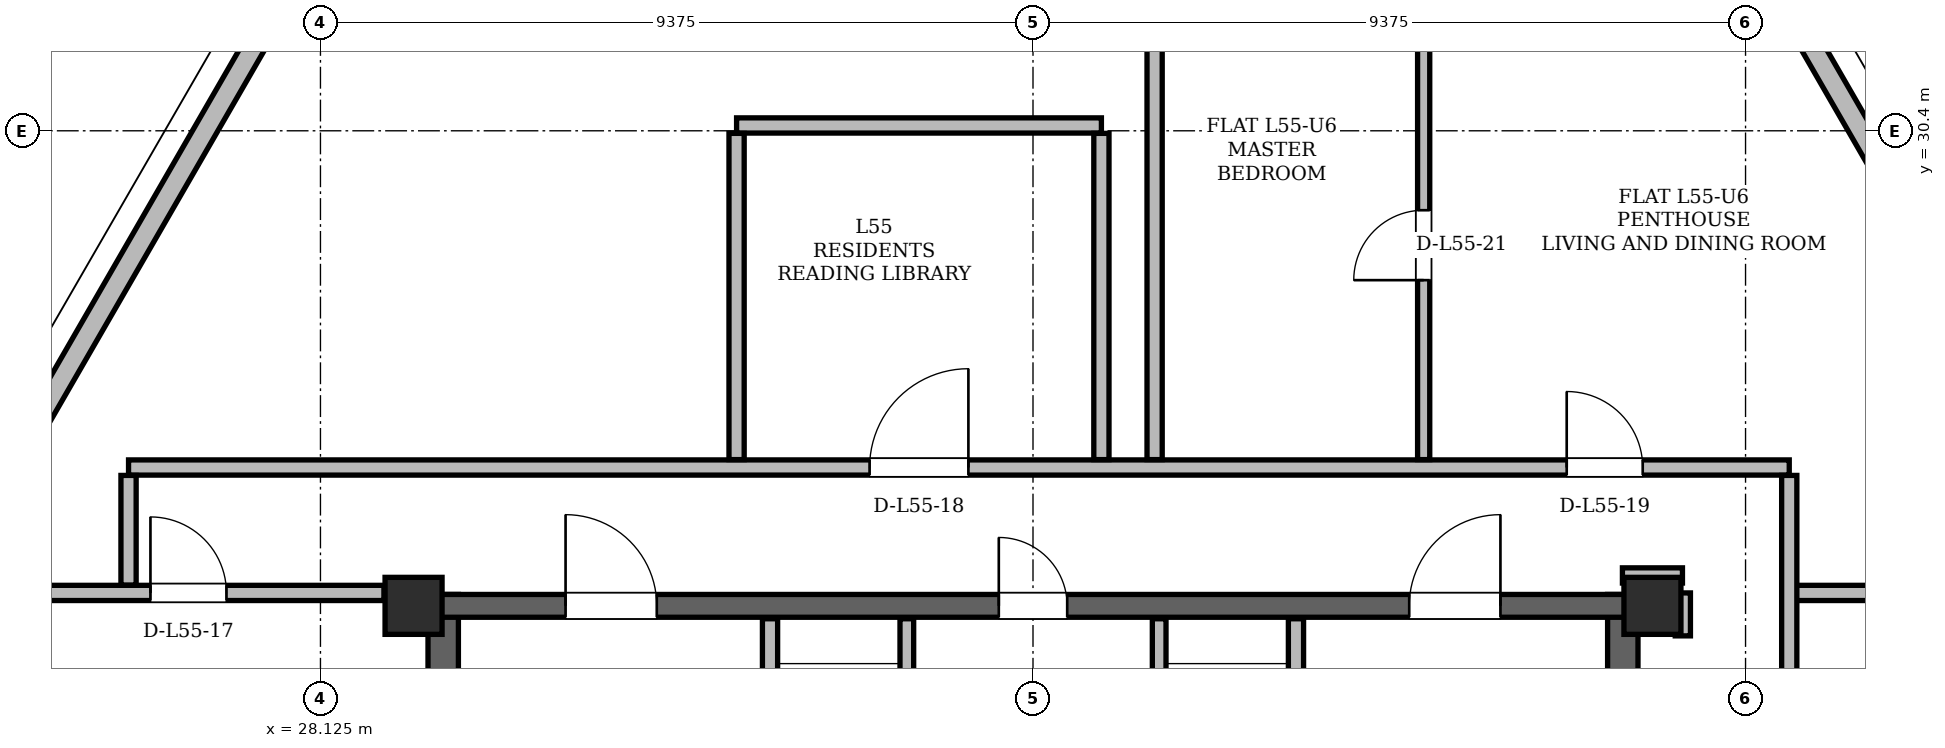
"""IFC4 building model, lengths in metres.
Left out: names, types, materials, properties, quantities, classifications, styles, units other than length and angle.
Written with IfcOpenShell. Run it as: python <this file> out.ifc"""

import sys

from ifc_helpers import new_model, si_unit, direction, frame, frame_2d, origin, origin_2d, place, context, subcontext, project, spatial, rectangle, hollow_rectangle, extrude, element, fill, save


model = new_model("IFC4")
c1 = context("Model", 3, precision=1e-05, world=origin(), true_north=direction((0.0, 1.0)))
c2 = subcontext(c1, "Body", "Model", "MODEL_VIEW")
j1 = project(units=[si_unit("LENGTHUNIT", "METRE"), si_unit("PLANEANGLEUNIT", "RADIAN")], contexts=[c1])
p1 = place(None, origin())
s1 = spatial("IfcSite", under=j1, at=p1, CompositionType="ELEMENT")
p2 = place(p1, origin())
s2 = spatial("IfcBuilding", under=s1, at=p2, CompositionType="ELEMENT")
p3 = place(p2, frame((0.0, 0.0, 209.1)))
s3 = spatial("IfcBuildingStorey", under=s2, at=p3, CompositionType="ELEMENT", Elevation=209.1)
for number, where, z_axis, x_axis in (
    (1, (45.65, 24.15, 0.0), (0.0, 0.0, 1.0), (1.0, 0.0, 0.0)),
    (2, (29.35, 24.15, 0.0), (0.0, 0.0, 1.0), (1.0, 0.0, 0.0)),
):
    element("IfcColumn", number, at=place(p3, frame(where, z_axis=z_axis, x_axis=x_axis)), inside=s3, PredefinedType="COLUMN", context=c2, shape_type="SweptSolid", body=[
        extrude(hollow_rectangle(XDim=0.75, YDim=0.75, WallThickness=0.06, at=origin_2d()), origin(), (0.0, 0.0, 1.0), 3.6),
    ])
for number, where, z_axis, x_axis in (
    (3, (29.74, 11.0, 0.0), (0.0, 0.0, 1.0), (0.0, 1.0, 0.0)),
    (4, (45.26, 11.0, 0.0), (0.0, 0.0, 1.0), (0.0, 1.0, 0.0)),
):
    element("IfcWall", number, at=place(p3, frame(where, z_axis=z_axis, x_axis=x_axis)), inside=s3, PredefinedType="SHEAR", context=c2, shape_type="SweptSolid", body=[
        extrude(rectangle(XDim=13.3, YDim=0.4, at=frame_2d((6.65, 0.0))), origin(), (0.0, 0.0, 1.0), 3.38),
    ])
p4 = place(p3, frame((29.65, 24.15, 0.0), z_axis=(0.0, 0.0, 1.0), x_axis=(1.0, 0.0, 0.0)))
e5 = element("IfcWall", 5, at=p4, inside=s3, PredefinedType="SHEAR", context=c2, shape_type="SweptSolid", body=[
    extrude(rectangle(XDim=15.7, YDim=0.3, at=frame_2d((7.85, 0.0))), origin(), (0.0, 0.0, 1.0), 3.38),
])
p5 = place(p4, frame((1.7, 0.0, 0.0)))
e6 = element("IfcOpeningElement", 6, at=p5, cuts=e5, PredefinedType="OPENING", context=c2, shape_type="SweptSolid", body=[
    extrude(rectangle(XDim=1.2, YDim=2.2, at=frame_2d((0.6, 1.1))), frame((0.0, 0.15, 0.0), z_axis=(0.0, -1.0, 0.0), x_axis=(1.0, 0.0, 0.0)), (0.0, 0.0, 1.0), 0.3),
])
p6 = place(p4, frame((12.8, 0.0, 0.0)))
e7 = element("IfcOpeningElement", 7, at=p6, cuts=e5, PredefinedType="OPENING", context=c2, shape_type="SweptSolid", body=[
    extrude(rectangle(XDim=1.2, YDim=2.2, at=frame_2d((0.6, 1.1))), frame((0.0, 0.15, 0.0), z_axis=(0.0, -1.0, 0.0), x_axis=(1.0, 0.0, 0.0)), (0.0, 0.0, 1.0), 0.3),
])
p7 = place(p4, frame((7.4, 0.0, 0.0)))
e8 = element("IfcOpeningElement", 8, at=p7, cuts=e5, PredefinedType="OPENING", context=c2, shape_type="SweptSolid", body=[
    extrude(rectangle(XDim=0.9, YDim=2.05, at=frame_2d((0.45, 1.025))), frame((0.0, 0.15, 0.0), z_axis=(0.0, -1.0, 0.0), x_axis=(1.0, 0.0, 0.0)), (0.0, 0.0, 1.0), 0.3),
])
p8 = place(p3, frame((59.246, 11.601, 0.0), z_axis=(0.0, 0.0, 1.0), x_axis=(-0.50000139879, 0.866024596191, 0.0)))
e9 = element("IfcWall", 9, at=p8, inside=s3, PredefinedType="SOLIDWALL", context=c2, shape_type="SweptSolid", body=[
    extrude(rectangle(XDim=36.467, YDim=0.29, at=frame_2d((18.233, 0.0))), origin(), (0.0, 0.0, 1.0), 2.677),
])
p9 = place(p8, frame((6.789, 0.0, 0.0)))
e10 = element("IfcOpeningElement", 10, at=p9, cuts=e9, PredefinedType="OPENING", context=c2, shape_type="SweptSolid", body=[
    extrude(rectangle(XDim=1.5, YDim=2.2, at=frame_2d((0.75, 1.1))), frame((0.0, 0.145, 0.0), z_axis=(0.0, -1.0, 0.0), x_axis=(1.0, 0.0, 0.0)), (0.0, 0.0, 1.0), 0.29),
])
p10 = place(p8, frame((26.932, 0.0, 0.0)))
e11 = element("IfcOpeningElement", 11, at=p10, cuts=e9, PredefinedType="OPENING", context=c2, shape_type="SweptSolid", body=[
    extrude(rectangle(XDim=1.5, YDim=2.2, at=frame_2d((0.75, 1.1))), frame((0.0, 0.145, 0.0), z_axis=(0.0, -1.0, 0.0), x_axis=(1.0, 0.0, 0.0)), (0.0, 0.0, 1.0), 0.29),
])
p11 = place(p8, frame((12.324, 0.0, 0.85)))
e12 = element("IfcOpeningElement", 12, at=p11, cuts=e9, PredefinedType="OPENING", context=c2, shape_type="SweptSolid", body=[
    extrude(rectangle(XDim=1.2, YDim=1.48, at=frame_2d((0.6, 0.74))), frame((0.0, 0.145, 0.0), z_axis=(0.0, -1.0, 0.0), x_axis=(1.0, 0.0, 0.0)), (0.0, 0.0, 1.0), 0.29),
])
p12 = place(p8, frame((2.218, 0.0, 0.85)))
e13 = element("IfcOpeningElement", 13, at=p12, cuts=e9, PredefinedType="OPENING", context=c2, shape_type="SweptSolid", body=[
    extrude(rectangle(XDim=1.2, YDim=1.48, at=frame_2d((0.6, 0.74))), frame((0.0, 0.145, 0.0), z_axis=(0.0, -1.0, 0.0), x_axis=(1.0, 0.0, 0.0)), (0.0, 0.0, 1.0), 0.29),
])
p13 = place(p8, frame((17.24, 0.0, 0.85)))
e14 = element("IfcOpeningElement", 14, at=p13, cuts=e9, PredefinedType="OPENING", context=c2, shape_type="SweptSolid", body=[
    extrude(rectangle(XDim=2.6, YDim=1.717, at=frame_2d((1.3, 0.858))), frame((0.0, 0.145, 0.0), z_axis=(0.0, -1.0, 0.0), x_axis=(1.0, 0.0, 0.0)), (0.0, 0.0, 1.0), 0.29),
])
p14 = place(p8, frame((34.098, 0.0, 0.85)))
e15 = element("IfcOpeningElement", 15, at=p14, cuts=e9, PredefinedType="OPENING", context=c2, shape_type="SweptSolid", body=[
    extrude(rectangle(XDim=1.2, YDim=1.48, at=frame_2d((0.6, 0.74))), frame((0.0, 0.145, 0.0), z_axis=(0.0, -1.0, 0.0), x_axis=(1.0, 0.0, 0.0)), (0.0, 0.0, 1.0), 0.29),
])
p15 = place(p3, frame((33.988, 43.182, 0.0), z_axis=(0.0, 0.0, 1.0), x_axis=(-0.50000139879, -0.866024596191, 0.0)))
e16 = element("IfcWall", 16, at=p15, inside=s3, PredefinedType="SOLIDWALL", context=c2, shape_type="SweptSolid", body=[
    extrude(rectangle(XDim=36.467, YDim=0.29, at=frame_2d((18.233, 0.0))), origin(), (0.0, 0.0, 1.0), 2.677),
])
p16 = place(p15, frame((3.429, 0.0, 0.0)))
e17 = element("IfcOpeningElement", 17, at=p16, cuts=e16, PredefinedType="OPENING", context=c2, shape_type="SweptSolid", body=[
    extrude(rectangle(XDim=1.5, YDim=2.2, at=frame_2d((0.75, 1.1))), frame((0.0, 0.145, 0.0), z_axis=(0.0, -1.0, 0.0), x_axis=(1.0, 0.0, 0.0)), (0.0, 0.0, 1.0), 0.29),
])
p17 = place(p15, frame((26.722, 0.0, 0.0)))
e18 = element("IfcOpeningElement", 18, at=p17, cuts=e16, PredefinedType="OPENING", context=c2, shape_type="SweptSolid", body=[
    extrude(rectangle(XDim=1.5, YDim=2.2, at=frame_2d((0.75, 1.1))), frame((0.0, 0.145, 0.0), z_axis=(0.0, -1.0, 0.0), x_axis=(1.0, 0.0, 0.0)), (0.0, 0.0, 1.0), 0.29),
])
p18 = place(p15, frame((33.056, 0.0, 0.85)))
e19 = element("IfcOpeningElement", 19, at=p18, cuts=e16, PredefinedType="OPENING", context=c2, shape_type="SweptSolid", body=[
    extrude(rectangle(XDim=1.6, YDim=1.7, at=frame_2d((0.8, 0.85))), frame((0.0, 0.145, 0.0), z_axis=(0.0, -1.0, 0.0), x_axis=(1.0, 0.0, 0.0)), (0.0, 0.0, 1.0), 0.29),
])
p19 = place(p15, frame((22.736, 0.0, 0.85)))
e20 = element("IfcOpeningElement", 20, at=p19, cuts=e16, PredefinedType="OPENING", context=c2, shape_type="SweptSolid", body=[
    extrude(rectangle(XDim=1.2, YDim=1.48, at=frame_2d((0.6, 0.74))), frame((0.0, 0.145, 0.0), z_axis=(0.0, -1.0, 0.0), x_axis=(1.0, 0.0, 0.0)), (0.0, 0.0, 1.0), 0.29),
])
p20 = place(p3, frame((34.04, 19.48, 0.0), z_axis=(0.0, 0.0, 1.0), x_axis=(0.0, 1.0, 0.0)))
e21 = element("IfcWall", 21, at=p20, inside=s3, PredefinedType="PARTITIONING", context=c2, shape_type="SweptSolid", body=[
    extrude(rectangle(XDim=4.5, YDim=0.2, at=frame_2d((2.25, 0.0))), origin(), (0.0, 0.0, 1.0), 3.38),
])
p21 = place(p20, frame((2.12, 0.0, 0.0)))
e22 = element("IfcOpeningElement", 22, at=p21, cuts=e21, PredefinedType="OPENING", context=c2, shape_type="SweptSolid", body=[
    extrude(rectangle(XDim=1.1, YDim=2.2, at=frame_2d((0.55, 1.1))), frame((0.0, 0.1, 0.0), z_axis=(0.0, -1.0, 0.0), x_axis=(1.0, 0.0, 0.0)), (0.0, 0.0, 1.0), 0.2),
])
p22 = place(p3, frame((35.84, 20.96, 0.0), z_axis=(0.0, 0.0, 1.0), x_axis=(0.0, 1.0, 0.0)))
e23 = element("IfcWall", 23, at=p22, inside=s3, PredefinedType="PARTITIONING", context=c2, shape_type="SweptSolid", body=[
    extrude(rectangle(XDim=3.02, YDim=0.18, at=frame_2d((1.51, 0.0))), origin(), (0.0, 0.0, 1.0), 3.38),
])
p23 = place(p3, frame((40.96, 19.48, 0.0), z_axis=(0.0, 0.0, 1.0), x_axis=(0.0, 1.0, 0.0)))
e24 = element("IfcWall", 24, at=p23, inside=s3, PredefinedType="PARTITIONING", context=c2, shape_type="SweptSolid", body=[
    extrude(rectangle(XDim=4.5, YDim=0.2, at=frame_2d((2.25, 0.0))), origin(), (0.0, 0.0, 1.0), 3.38),
])
p24 = place(p23, frame((2.12, 0.0, 0.0)))
e25 = element("IfcOpeningElement", 25, at=p24, cuts=e24, PredefinedType="OPENING", context=c2, shape_type="SweptSolid", body=[
    extrude(rectangle(XDim=1.1, YDim=2.2, at=frame_2d((0.55, 1.1))), frame((0.0, 0.1, 0.0), z_axis=(0.0, -1.0, 0.0), x_axis=(1.0, 0.0, 0.0)), (0.0, 0.0, 1.0), 0.2),
])
p25 = place(p3, frame((39.16, 20.96, 0.0), z_axis=(0.0, 0.0, 1.0), x_axis=(0.0, 1.0, 0.0)))
e26 = element("IfcWall", 26, at=p25, inside=s3, PredefinedType="PARTITIONING", context=c2, shape_type="SweptSolid", body=[
    extrude(rectangle(XDim=3.02, YDim=0.18, at=frame_2d((1.51, 0.0))), origin(), (0.0, 0.0, 1.0), 3.38),
])
p26 = place(p3, frame((23.27, 24.32, 0.0), z_axis=(0.0, 0.0, 1.0), x_axis=(1.0, 0.0, 0.0)))
e27 = element("IfcWall", 27, at=p26, inside=s3, PredefinedType="PARTITIONING", context=c2, shape_type="SweptSolid", body=[
    extrude(rectangle(XDim=5.69, YDim=0.2, at=frame_2d((2.845, 0.0))), origin(), (0.0, 0.0, 1.0), 3.38),
])
p27 = place(p26, frame((2.618, 0.0, 0.0)))
e28 = element("IfcOpeningElement", 28, at=p27, cuts=e27, PredefinedType="OPENING", context=c2, shape_type="SweptSolid", body=[
    extrude(rectangle(XDim=1.0, YDim=2.18, at=frame_2d((0.5, 1.09))), frame((0.0, 0.1, 0.0), z_axis=(0.0, -1.0, 0.0), x_axis=(1.0, 0.0, 0.0)), (0.0, 0.0, 1.0), 0.2),
])
p28 = place(p3, frame((47.45, 24.32, 0.0), z_axis=(0.0, 0.0, 1.0), x_axis=(1.0, 0.0, 0.0)))
e29 = element("IfcWall", 29, at=p28, inside=s3, PredefinedType="PARTITIONING", context=c2, shape_type="SweptSolid", body=[
    extrude(rectangle(XDim=4.28, YDim=0.2, at=frame_2d((2.14, 0.0))), origin(), (0.0, 0.0, 1.0), 3.38),
])
p29 = place(p3, frame((45.255, 24.55, 0.0), z_axis=(0.0, 0.0, 1.0), x_axis=(1.0, 0.0, 0.0)))
e30 = element("IfcWall", 30, at=p29, inside=s3, PredefinedType="PARTITIONING", context=c2, shape_type="SweptSolid", body=[
    extrude(rectangle(XDim=0.79, YDim=0.2, at=frame_2d((0.395, 0.0))), origin(), (0.0, 0.0, 1.0), 2.913),
])
p30 = place(p3, frame((25.6, 25.97, 0.0), z_axis=(0.0, 0.0, 1.0), x_axis=(1.0, 0.0, 0.0)))
e31 = element("IfcWall", 31, at=p30, inside=s3, PredefinedType="PARTITIONING", context=c2, shape_type="SweptSolid", body=[
    extrude(rectangle(XDim=21.85, YDim=0.2, at=frame_2d((10.925, 0.0))), origin(), (0.0, 0.0, 1.0), 2.913),
])
p31 = place(p30, frame((9.75, 0.0, 0.0)))
e32 = element("IfcOpeningElement", 32, at=p31, cuts=e31, PredefinedType="OPENING", context=c2, shape_type="SweptSolid", body=[
    extrude(rectangle(XDim=1.3, YDim=2.2, at=frame_2d((0.65, 1.1))), frame((0.0, 0.1, 0.0), z_axis=(0.0, -1.0, 0.0), x_axis=(1.0, 0.0, 0.0)), (0.0, 0.0, 1.0), 0.2),
])
p32 = place(p30, frame((18.922, 0.0, 0.0)))
e33 = element("IfcOpeningElement", 33, at=p32, cuts=e31, PredefinedType="OPENING", context=c2, shape_type="SweptSolid", body=[
    extrude(rectangle(XDim=1.0, YDim=2.18, at=frame_2d((0.5, 1.09))), frame((0.0, 0.1, 0.0), z_axis=(0.0, -1.0, 0.0), x_axis=(1.0, 0.0, 0.0)), (0.0, 0.0, 1.0), 0.2),
])
p33 = place(p3, frame((33.6, 30.47, 0.0), z_axis=(0.0, 0.0, 1.0), x_axis=(1.0, 0.0, 0.0)))
e34 = element("IfcWall", 34, at=p33, inside=s3, PredefinedType="PARTITIONING", context=c2, shape_type="SweptSolid", body=[
    extrude(rectangle(XDim=4.8, YDim=0.2, at=frame_2d((2.4, 0.0))), origin(), (0.0, 0.0, 1.0), 3.38),
])
p34 = place(p3, frame((25.6, 24.424, 0.0), z_axis=(0.0, 0.0, 1.0), x_axis=(0.0, 1.0, 0.0)))
e35 = element("IfcWall", 35, at=p34, inside=s3, PredefinedType="PARTITIONING", context=c2, shape_type="SweptSolid", body=[
    extrude(rectangle(XDim=1.442, YDim=0.2, at=frame_2d((0.721, 0.0))), origin(), (0.0, 0.0, 1.0), 3.38),
])
for number, where, z_axis, x_axis in (
    (36, (33.6, 26.074, 0.0), (0.0, 0.0, 1.0), (0.0, 1.0, 0.0)),
    (37, (38.4, 26.074, 0.0), (0.0, 0.0, 1.0), (0.0, 1.0, 0.0)),
):
    element("IfcWall", number, at=place(p3, frame(where, z_axis=z_axis, x_axis=x_axis)), inside=s3, PredefinedType="PARTITIONING", context=c2, shape_type="SweptSolid", body=[
        extrude(rectangle(XDim=4.292, YDim=0.2, at=frame_2d((2.146, 0.0))), origin(), (0.0, 0.0, 1.0), 3.38),
    ])
p35 = place(p3, frame((39.1, 26.074, 0.0), z_axis=(0.0, 0.0, 1.0), x_axis=(0.0, 1.0, 0.0)))
e38 = element("IfcWall", 38, at=p35, inside=s3, PredefinedType="PARTITIONING", context=c2, shape_type="SweptSolid", body=[
    extrude(rectangle(XDim=16.959, YDim=0.2, at=frame_2d((8.479, 0.0))), origin(), (0.0, 0.0, 1.0), 3.38),
])
p36 = place(p3, frame((42.64, 26.074, 0.0), z_axis=(0.0, 0.0, 1.0), x_axis=(0.0, 1.0, 0.0)))
e39 = element("IfcWall", 39, at=p36, inside=s3, PredefinedType="PARTITIONING", context=c2, shape_type="SweptSolid", body=[
    extrude(rectangle(XDim=13.991, YDim=0.16, at=frame_2d((6.995, 0.0))), origin(), (0.0, 0.0, 1.0), 2.913),
])
p37 = place(p36, frame((2.361, 0.0, 0.0)))
e40 = element("IfcOpeningElement", 40, at=p37, cuts=e39, PredefinedType="OPENING", context=c2, shape_type="SweptSolid", body=[
    extrude(rectangle(XDim=0.92, YDim=2.12, at=frame_2d((0.46, 1.06))), frame((0.0, 0.08, 0.0), z_axis=(0.0, -1.0, 0.0), x_axis=(1.0, 0.0, 0.0)), (0.0, 0.0, 1.0), 0.16),
])
p38 = place(p36, frame((7.441, 0.0, 0.0)))
e41 = element("IfcOpeningElement", 41, at=p38, cuts=e39, PredefinedType="OPENING", context=c2, shape_type="SweptSolid", body=[
    extrude(rectangle(XDim=0.95, YDim=2.1, at=frame_2d((0.475, 1.05))), frame((0.0, 0.08, 0.0), z_axis=(0.0, -1.0, 0.0), x_axis=(1.0, 0.0, 0.0)), (0.0, 0.0, 1.0), 0.16),
])
p39 = place(p36, frame((10.403, 0.0, 0.0)))
e42 = element("IfcOpeningElement", 42, at=p39, cuts=e39, PredefinedType="OPENING", context=c2, shape_type="SweptSolid", body=[
    extrude(rectangle(XDim=0.95, YDim=2.1, at=frame_2d((0.475, 1.05))), frame((0.0, 0.08, 0.0), z_axis=(0.0, -1.0, 0.0), x_axis=(1.0, 0.0, 0.0)), (0.0, 0.0, 1.0), 0.16),
])
p40 = place(p36, frame((12.795, 0.0, 0.0)))
e43 = element("IfcOpeningElement", 43, at=p40, cuts=e39, PredefinedType="OPENING", context=c2, shape_type="SweptSolid", body=[
    extrude(rectangle(XDim=0.88, YDim=2.08, at=frame_2d((0.44, 1.04))), frame((0.0, 0.08, 0.0), z_axis=(0.0, -1.0, 0.0), x_axis=(1.0, 0.0, 0.0)), (0.0, 0.0, 1.0), 0.16),
])
p41 = place(p3, frame((46.05, 23.755, 0.0), z_axis=(0.0, 0.0, 1.0), x_axis=(0.0, 1.0, 0.0)))
e44 = element("IfcWall", 44, at=p41, inside=s3, PredefinedType="PARTITIONING", context=c2, shape_type="SweptSolid", body=[
    extrude(rectangle(XDim=0.565, YDim=0.2, at=frame_2d((0.283, 0.0))), origin(), (0.0, 0.0, 1.0), 3.38),
])
p42 = place(p3, frame((47.45, 9.404, 0.0), z_axis=(0.0, 0.0, 1.0), x_axis=(0.0, 1.0, 0.0)))
e45 = element("IfcWall", 45, at=p42, inside=s3, PredefinedType="PARTITIONING", context=c2, shape_type="SweptSolid", body=[
    extrude(rectangle(XDim=16.462, YDim=0.2, at=frame_2d((8.231, 0.0))), origin(), (0.0, 0.0, 1.0), 2.913),
])
p43 = place(p42, frame((9.496, 0.0, 0.0)))
e46 = element("IfcOpeningElement", 46, at=p43, cuts=e45, PredefinedType="OPENING", context=c2, shape_type="SweptSolid", body=[
    extrude(rectangle(XDim=1.0, YDim=2.18, at=frame_2d((0.5, 1.09))), frame((0.0, 0.1, 0.0), z_axis=(0.0, -1.0, 0.0), x_axis=(1.0, 0.0, 0.0)), (0.0, 0.0, 1.0), 0.2),
])
p44 = place(p5, origin())
e47 = element("IfcDoor", 47, at=p44, inside=s3, OperationType="SINGLE_SWING_LEFT", PredefinedType="DOOR", context=c2, shape_type="SweptSolid", body=[
    extrude(rectangle(XDim=1.2, YDim=2.2, at=frame_2d((0.6, 1.1))), frame((0.0, 0.025, 0.0), z_axis=(0.0, -1.0, 0.0), x_axis=(1.0, 0.0, 0.0)), (0.0, 0.0, 1.0), 0.05),
])
fill(e6, e47)
p45 = place(p6, origin())
e48 = element("IfcDoor", 48, at=p45, inside=s3, OperationType="SINGLE_SWING_RIGHT", PredefinedType="DOOR", context=c2, shape_type="SweptSolid", body=[
    extrude(rectangle(XDim=1.2, YDim=2.2, at=frame_2d((0.6, 1.1))), frame((0.0, 0.025, 0.0), z_axis=(0.0, -1.0, 0.0), x_axis=(1.0, 0.0, 0.0)), (0.0, 0.0, 1.0), 0.05),
])
fill(e7, e48)
p46 = place(p7, origin())
e49 = element("IfcDoor", 49, at=p46, inside=s3, OperationType="SINGLE_SWING_LEFT", PredefinedType="DOOR", context=c2, shape_type="SweptSolid", body=[
    extrude(rectangle(XDim=0.9, YDim=2.05, at=frame_2d((0.45, 1.025))), frame((0.0, 0.025, 0.0), z_axis=(0.0, -1.0, 0.0), x_axis=(1.0, 0.0, 0.0)), (0.0, 0.0, 1.0), 0.05),
])
fill(e8, e49)
p47 = place(p27, origin())
e50 = element("IfcDoor", 50, at=p47, inside=s3, OperationType="SINGLE_SWING_LEFT", PredefinedType="DOOR", context=c2, shape_type="SweptSolid", body=[
    extrude(rectangle(XDim=1.0, YDim=2.18, at=frame_2d((0.5, 1.09))), frame((0.0, 0.025, 0.0), z_axis=(0.0, -1.0, 0.0), x_axis=(1.0, 0.0, 0.0)), (0.0, 0.0, 1.0), 0.05),
])
fill(e28, e50)
p48 = place(p31, origin())
e51 = element("IfcDoor", 51, at=p48, inside=s3, OperationType="SINGLE_SWING_RIGHT", PredefinedType="DOOR", context=c2, shape_type="SweptSolid", body=[
    extrude(rectangle(XDim=1.3, YDim=2.2, at=frame_2d((0.65, 1.1))), frame((0.0, 0.025, 0.0), z_axis=(0.0, -1.0, 0.0), x_axis=(1.0, 0.0, 0.0)), (0.0, 0.0, 1.0), 0.05),
])
fill(e32, e51)
p49 = place(p32, origin())
e52 = element("IfcDoor", 52, at=p49, inside=s3, OperationType="SINGLE_SWING_LEFT", PredefinedType="DOOR", context=c2, shape_type="SweptSolid", body=[
    extrude(rectangle(XDim=1.0, YDim=2.18, at=frame_2d((0.5, 1.09))), frame((0.0, 0.025, 0.0), z_axis=(0.0, -1.0, 0.0), x_axis=(1.0, 0.0, 0.0)), (0.0, 0.0, 1.0), 0.05),
])
fill(e33, e52)
p50 = place(p37, origin())
e53 = element("IfcDoor", 53, at=p50, inside=s3, OperationType="SINGLE_SWING_LEFT", PredefinedType="DOOR", context=c2, shape_type="SweptSolid", body=[
    extrude(rectangle(XDim=0.92, YDim=2.12, at=frame_2d((0.46, 1.06))), frame((0.0, 0.025, 0.0), z_axis=(0.0, -1.0, 0.0), x_axis=(1.0, 0.0, 0.0)), (0.0, 0.0, 1.0), 0.05),
])
fill(e40, e53)
save(model, sys.argv[1])
